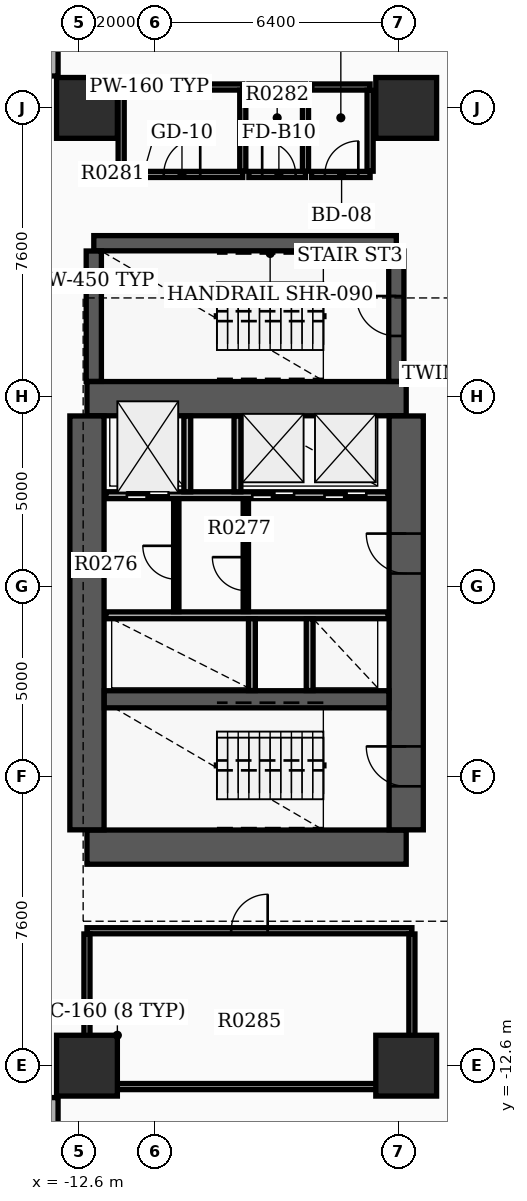
"""IFC4 building model, lengths in metres.
Left out: names, types, materials, properties, quantities, classifications, styles, units other than length and angle.
Written with IfcOpenShell. Run it as: python <this file> out.ifc"""

import sys

from ifc_helpers import new_model, si_unit, direction, frame, frame_2d, origin, origin_2d, place, context, subcontext, project, spatial, rectangle, extrude, element, fill, save


model = new_model("IFC4")
c1 = context("Model", 3, precision=1e-05, world=origin(), true_north=direction((0.0, 1.0)))
c2 = subcontext(c1, "Body", "Model", "MODEL_VIEW")
j1 = project(units=[si_unit("LENGTHUNIT", "METRE"), si_unit("PLANEANGLEUNIT", "RADIAN")], contexts=[c1])
p1 = place(None, origin())
s1 = spatial("IfcSite", under=j1, at=p1, CompositionType="ELEMENT")
p2 = place(p1, origin())
s2 = spatial("IfcBuilding", under=s1, at=p2, CompositionType="ELEMENT")
p3 = place(p2, frame((0.0, 0.0, 23.7)))
s3 = spatial("IfcBuildingStorey", under=s2, at=p3, CompositionType="ELEMENT", Elevation=23.7)
for number, where, z_axis, x_axis in (
    (1, (-12.4, -6.85, 0.0), (0.0, 0.0, 1.0), (1.0, 0.0, 0.0)),
    (2, (-12.4, 4.95, 0.0), (0.0, 0.0, 1.0), (1.0, 0.0, 0.0)),
):
    element("IfcWall", number, at=place(p3, frame(where, z_axis=z_axis, x_axis=x_axis)), inside=s3, PredefinedType="SHEAR", context=c2, shape_type="SweptSolid", body=[
        extrude(rectangle(XDim=8.4, YDim=0.9, at=frame_2d((4.2, 0.0))), origin(), (0.0, 0.0, 1.0), 3.7),
    ])
p4 = place(p3, frame((-12.4, -6.395, 0.0), z_axis=(0.0, 0.0, 1.0), x_axis=(0.0, 1.0, 0.0)))
e3 = element("IfcWall", 3, at=p4, inside=s3, PredefinedType="SHEAR", context=c2, shape_type="SweptSolid", body=[
    extrude(rectangle(XDim=10.89, YDim=0.9, at=frame_2d((5.445, 0.0))), origin(), (0.0, 0.0, 1.0), 3.7),
])
p5 = place(p3, frame((-4.0, -6.395, 0.0), z_axis=(0.0, 0.0, 1.0), x_axis=(0.0, 1.0, 0.0)))
e4 = element("IfcWall", 4, at=p5, inside=s3, PredefinedType="SHEAR", context=c2, shape_type="SweptSolid", body=[
    extrude(rectangle(XDim=10.89, YDim=0.9, at=frame_2d((5.445, 0.0))), origin(), (0.0, 0.0, 1.0), 3.7),
])
p6 = place(p5, frame((1.145, 0.0, 0.0)))
e5 = element("IfcOpeningElement", 5, at=p6, cuts=e4, PredefinedType="OPENING", context=c2, shape_type="SweptSolid", body=[
    extrude(rectangle(XDim=1.05, YDim=2.15, at=frame_2d((0.525, 1.075))), frame((0.0, 0.46, 0.0), z_axis=(0.0, -1.0, 0.0), x_axis=(1.0, 0.0, 0.0)), (0.0, 0.0, 1.0), 0.92),
])
p7 = place(p5, frame((6.745, 0.0, 0.0)))
e6 = element("IfcOpeningElement", 6, at=p7, cuts=e4, PredefinedType="OPENING", context=c2, shape_type="SweptSolid", body=[
    extrude(rectangle(XDim=1.05, YDim=2.15, at=frame_2d((0.525, 1.075))), frame((0.0, 0.46, 0.0), z_axis=(0.0, -1.0, 0.0), x_axis=(1.0, 0.0, 0.0)), (0.0, 0.0, 1.0), 0.92),
])
p8 = place(p3, frame((-11.945, -2.96, 0.0), z_axis=(0.0, 0.0, 1.0), x_axis=(1.0, 0.0, 0.0)))
e7 = element("IfcWall", 7, at=p8, inside=s3, PredefinedType="SHEAR", context=c2, shape_type="SweptSolid", body=[
    extrude(rectangle(XDim=7.49, YDim=0.45, at=frame_2d((3.745, 0.0))), origin(), (0.0, 0.0, 1.0), 3.7),
])
p9 = place(p3, frame((-12.22, 9.04, 0.0), z_axis=(0.0, 0.0, 1.0), x_axis=(1.0, 0.0, 0.0)))
e8 = element("IfcWall", 8, at=p9, inside=s3, PredefinedType="SHEAR", context=c2, shape_type="SweptSolid", body=[
    extrude(rectangle(XDim=7.96, YDim=0.4, at=frame_2d((3.98, 0.0))), origin(), (0.0, 0.0, 1.0), 3.7),
])
p10 = place(p3, frame((-12.22, 5.405, 0.0), z_axis=(0.0, 0.0, 1.0), x_axis=(0.0, 1.0, 0.0)))
e9 = element("IfcWall", 9, at=p10, inside=s3, PredefinedType="SHEAR", context=c2, shape_type="SweptSolid", body=[
    extrude(rectangle(XDim=3.43, YDim=0.4, at=frame_2d((1.715, 0.0))), origin(), (0.0, 0.0, 1.0), 3.7),
])
p11 = place(p3, frame((-4.26, 5.405, 0.0), z_axis=(0.0, 0.0, 1.0), x_axis=(0.0, 1.0, 0.0)))
e10 = element("IfcWall", 10, at=p11, inside=s3, PredefinedType="SHEAR", context=c2, shape_type="SweptSolid", body=[
    extrude(rectangle(XDim=3.43, YDim=0.4, at=frame_2d((1.715, 0.0))), origin(), (0.0, 0.0, 1.0), 3.7),
])
p12 = place(p11, frame((1.195, 0.0, 0.0)))
e11 = element("IfcOpeningElement", 11, at=p12, cuts=e10, PredefinedType="OPENING", context=c2, shape_type="SweptSolid", body=[
    extrude(rectangle(XDim=1.05, YDim=2.15, at=frame_2d((0.525, 1.075))), frame((0.0, 0.21, 0.0), z_axis=(0.0, -1.0, 0.0), x_axis=(1.0, 0.0, 0.0)), (0.0, 0.0, 1.0), 0.42),
])
for number, where, z_axis, x_axis in (
    (12, (-12.4, -12.6, 0.0), (0.0, 0.0, 1.0), (1.0, 0.0, 0.0)),
    (13, (-12.4, 12.6, 0.0), (0.0, 0.0, 1.0), (1.0, 0.0, 0.0)),
    (14, (-4.0, -12.6, 0.0), (0.0, 0.0, 1.0), (1.0, 0.0, 0.0)),
    (15, (-4.0, 12.6, 0.0), (0.0, 0.0, 1.0), (1.0, 0.0, 0.0)),
):
    element("IfcColumn", number, at=place(p3, frame(where, z_axis=z_axis, x_axis=x_axis)), inside=s3, PredefinedType="COLUMN", context=c2, shape_type="SweptSolid", body=[
        extrude(rectangle(XDim=1.6, YDim=1.6, at=origin_2d()), origin(), (0.0, 0.0, 1.0), 3.9),
    ])
for number, where, z_axis, x_axis in (
    (16, (-13.3, 13.44, 0.0), (0.0, 0.0, 1.0), (0.0, 1.0, 0.0)),
    (17, (-13.3, -13.44, 0.0), (0.0, 0.0, 1.0), (0.0, -1.0, 0.0)),
):
    element("IfcWall", number, at=place(p3, frame(where, z_axis=z_axis, x_axis=x_axis)), inside=s3, PredefinedType="STANDARD", context=c2, shape_type="SweptSolid", body=[
        extrude(rectangle(XDim=1.5, YDim=0.28, at=frame_2d((0.75, 0.0))), origin(), (0.0, 0.0, 1.0), 2.91),
    ])
p13 = place(p3, frame((-11.9, 2.41, 0.0), z_axis=(0.0, 0.0, 1.0), x_axis=(1.0, 0.0, 0.0)))
e18 = element("IfcWall", 18, at=p13, inside=s3, PredefinedType="SOLIDWALL", context=c2, shape_type="SweptSolid", body=[
    extrude(rectangle(XDim=7.42, YDim=0.18, at=frame_2d((3.71, 0.0))), origin(), (0.0, 0.0, 1.0), 2.9),
])
p14 = place(p13, frame((0.55, 0.0, 0.0)))
e19 = element("IfcOpeningElement", 19, at=p14, cuts=e18, PredefinedType="OPENING", context=c2, shape_type="SweptSolid", body=[
    extrude(rectangle(XDim=1.1, YDim=2.15, at=frame_2d((0.55, 1.075))), frame((0.0, 0.1, 0.0), z_axis=(0.0, -1.0, 0.0), x_axis=(1.0, 0.0, 0.0)), (0.0, 0.0, 1.0), 0.2),
])
p15 = place(p13, frame((3.85, 0.0, 0.0)))
e20 = element("IfcOpeningElement", 20, at=p15, cuts=e18, PredefinedType="OPENING", context=c2, shape_type="SweptSolid", body=[
    extrude(rectangle(XDim=1.1, YDim=2.15, at=frame_2d((0.55, 1.075))), frame((0.0, 0.1, 0.0), z_axis=(0.0, -1.0, 0.0), x_axis=(1.0, 0.0, 0.0)), (0.0, 0.0, 1.0), 0.2),
])
p16 = place(p13, frame((5.75, 0.0, 0.0)))
e21 = element("IfcOpeningElement", 21, at=p16, cuts=e18, PredefinedType="OPENING", context=c2, shape_type="SweptSolid", body=[
    extrude(rectangle(XDim=1.1, YDim=2.15, at=frame_2d((0.55, 1.075))), frame((0.0, 0.1, 0.0), z_axis=(0.0, -1.0, 0.0), x_axis=(1.0, 0.0, 0.0)), (0.0, 0.0, 1.0), 0.2),
])
p17 = place(p3, frame((-11.9, -0.75, 0.0), z_axis=(0.0, 0.0, 1.0), x_axis=(1.0, 0.0, 0.0)))
e22 = element("IfcWall", 22, at=p17, inside=s3, PredefinedType="SOLIDWALL", context=c2, shape_type="SweptSolid", body=[
    extrude(rectangle(XDim=7.42, YDim=0.18, at=frame_2d((3.71, 0.0))), origin(), (0.0, 0.0, 1.0), 2.9),
])
for number, where, z_axis, x_axis in (
    (23, (-9.76, 2.5, 0.0), (0.0, 0.0, 1.0), (0.0, 1.0, 0.0)),
    (24, (-8.44, 2.5, 0.0), (0.0, 0.0, 1.0), (0.0, 1.0, 0.0)),
):
    element("IfcWall", number, at=place(p3, frame(where, z_axis=z_axis, x_axis=x_axis)), inside=s3, PredefinedType="SOLIDWALL", context=c2, shape_type="SweptSolid", body=[
        extrude(rectangle(XDim=1.99, YDim=0.18, at=frame_2d((0.995, 0.0))), origin(), (0.0, 0.0, 1.0), 2.9),
    ])
for number, where, z_axis, x_axis in (
    (25, (-8.06, -2.73, 0.0), (0.0, 0.0, 1.0), (0.0, 1.0, 0.0)),
    (26, (-6.54, -2.73, 0.0), (0.0, 0.0, 1.0), (0.0, 1.0, 0.0)),
):
    element("IfcWall", number, at=place(p3, frame(where, z_axis=z_axis, x_axis=x_axis)), inside=s3, PredefinedType="SOLIDWALL", context=c2, shape_type="SweptSolid", body=[
        extrude(rectangle(XDim=1.89, YDim=0.18, at=frame_2d((0.945, 0.0))), origin(), (0.0, 0.0, 1.0), 2.9),
    ])
p18 = place(p3, frame((-8.22, -0.65, 0.0), z_axis=(0.0, 0.0, 1.0), x_axis=(0.0, 1.0, 0.0)))
e27 = element("IfcWall", 27, at=p18, inside=s3, PredefinedType="SOLIDWALL", context=c2, shape_type="SweptSolid", body=[
    extrude(rectangle(XDim=2.96, YDim=0.14, at=frame_2d((1.48, 0.0))), origin(), (0.0, 0.0, 1.0), 2.9),
])
p19 = place(p18, frame((0.55, 0.0, 0.0)))
e28 = element("IfcOpeningElement", 28, at=p19, cuts=e27, PredefinedType="OPENING", context=c2, shape_type="SweptSolid", body=[
    extrude(rectangle(XDim=0.88, YDim=2.1, at=frame_2d((0.44, 1.05))), frame((0.0, 0.08, 0.0), z_axis=(0.0, -1.0, 0.0), x_axis=(1.0, 0.0, 0.0)), (0.0, 0.0, 1.0), 0.16),
])
p20 = place(p3, frame((-10.05, -0.652, 0.0), z_axis=(0.0, 0.0, 1.0), x_axis=(0.0, 1.0, 0.0)))
e29 = element("IfcWall", 29, at=p20, inside=s3, PredefinedType="PARTITIONING", context=c2, shape_type="SweptSolid", body=[
    extrude(rectangle(XDim=2.962, YDim=0.14, at=frame_2d((1.481, 0.0))), origin(), (0.0, 0.0, 1.0), 2.9),
])
p21 = place(p20, frame((0.85, 0.0, 0.0)))
e30 = element("IfcOpeningElement", 30, at=p21, cuts=e29, PredefinedType="OPENING", context=c2, shape_type="SweptSolid", body=[
    extrude(rectangle(XDim=0.88, YDim=2.1, at=frame_2d((0.44, 1.05))), frame((0.0, 0.08, 0.0), z_axis=(0.0, -1.0, 0.0), x_axis=(1.0, 0.0, 0.0)), (0.0, 0.0, 1.0), 0.16),
])
p22 = place(p3, frame((-11.5, 10.85, 0.0), z_axis=(0.0, 0.0, 1.0), x_axis=(1.0, 0.0, 0.0)))
e31 = element("IfcWall", 31, at=p22, inside=s3, PredefinedType="PARTITIONING", context=c2, shape_type="SweptSolid", body=[
    extrude(rectangle(XDim=3.2, YDim=0.16, at=frame_2d((1.6, 0.0))), origin(), (0.0, 0.0, 1.0), 2.9),
])
p23 = place(p22, frame((1.12, 0.0, 0.0)))
e32 = element("IfcOpeningElement", 32, at=p23, cuts=e31, PredefinedType="OPENING", context=c2, shape_type="SweptSolid", body=[
    extrude(rectangle(XDim=0.96, YDim=2.15, at=frame_2d((0.48, 1.075))), frame((0.0, 0.09, 0.0), z_axis=(0.0, -1.0, 0.0), x_axis=(1.0, 0.0, 0.0)), (0.0, 0.0, 1.0), 0.18),
])
p24 = place(p3, frame((-11.5, 13.15, 0.0), z_axis=(0.0, 0.0, 1.0), x_axis=(1.0, 0.0, 0.0)))
e33 = element("IfcWall", 33, at=p24, inside=s3, PredefinedType="PARTITIONING", context=c2, shape_type="SweptSolid", body=[
    extrude(rectangle(XDim=3.2, YDim=0.16, at=frame_2d((1.6, 0.0))), origin(), (0.0, 0.0, 1.0), 2.9),
])
for number, where, z_axis, x_axis in (
    (34, (-11.5, 10.935, 0.0), (0.0, 0.0, 1.0), (0.0, 1.0, 0.0)),
    (35, (-8.3, 10.935, 0.0), (0.0, 0.0, 1.0), (0.0, 1.0, 0.0)),
):
    element("IfcWall", number, at=place(p3, frame(where, z_axis=z_axis, x_axis=x_axis)), inside=s3, PredefinedType="PARTITIONING", context=c2, shape_type="SweptSolid", body=[
        extrude(rectangle(XDim=2.13, YDim=0.16, at=frame_2d((1.065, 0.0))), origin(), (0.0, 0.0, 1.0), 2.9),
    ])
p25 = place(p3, frame((-8.14, 10.85, 0.0), z_axis=(0.0, 0.0, 1.0), x_axis=(1.0, 0.0, 0.0)))
e36 = element("IfcWall", 36, at=p25, inside=s3, PredefinedType="PARTITIONING", context=c2, shape_type="SweptSolid", body=[
    extrude(rectangle(XDim=1.49, YDim=0.16, at=frame_2d((0.745, 0.0))), origin(), (0.0, 0.0, 1.0), 2.9),
])
p26 = place(p25, frame((0.35, 0.0, 0.0)))
e37 = element("IfcOpeningElement", 37, at=p26, cuts=e36, PredefinedType="OPENING", context=c2, shape_type="SweptSolid", body=[
    extrude(rectangle(XDim=0.88, YDim=2.1, at=frame_2d((0.44, 1.05))), frame((0.0, 0.09, 0.0), z_axis=(0.0, -1.0, 0.0), x_axis=(1.0, 0.0, 0.0)), (0.0, 0.0, 1.0), 0.18),
])
p27 = place(p3, frame((-8.14, 13.15, 0.0), z_axis=(0.0, 0.0, 1.0), x_axis=(1.0, 0.0, 0.0)))
e38 = element("IfcWall", 38, at=p27, inside=s3, PredefinedType="PARTITIONING", context=c2, shape_type="SweptSolid", body=[
    extrude(rectangle(XDim=1.49, YDim=0.16, at=frame_2d((0.745, 0.0))), origin(), (0.0, 0.0, 1.0), 2.9),
])
p28 = place(p3, frame((-6.65, 10.935, 0.0), z_axis=(0.0, 0.0, 1.0), x_axis=(0.0, 1.0, 0.0)))
e39 = element("IfcWall", 39, at=p28, inside=s3, PredefinedType="PARTITIONING", context=c2, shape_type="SweptSolid", body=[
    extrude(rectangle(XDim=2.13, YDim=0.16, at=frame_2d((1.065, 0.0))), origin(), (0.0, 0.0, 1.0), 2.9),
])
p29 = place(p3, frame((-6.49, 10.85, 0.0), z_axis=(0.0, 0.0, 1.0), x_axis=(1.0, 0.0, 0.0)))
e40 = element("IfcWall", 40, at=p29, inside=s3, PredefinedType="PARTITIONING", context=c2, shape_type="SweptSolid", body=[
    extrude(rectangle(XDim=1.54, YDim=0.16, at=frame_2d((0.77, 0.0))), origin(), (0.0, 0.0, 1.0), 2.9),
])
p30 = place(p29, frame((0.35, 0.0, 0.0)))
e41 = element("IfcOpeningElement", 41, at=p30, cuts=e40, PredefinedType="OPENING", context=c2, shape_type="SweptSolid", body=[
    extrude(rectangle(XDim=0.88, YDim=2.15, at=frame_2d((0.44, 1.075))), frame((0.0, 0.09, 0.0), z_axis=(0.0, -1.0, 0.0), x_axis=(1.0, 0.0, 0.0)), (0.0, 0.0, 1.0), 0.18),
])
p31 = place(p3, frame((-6.49, 13.15, 0.0), z_axis=(0.0, 0.0, 1.0), x_axis=(1.0, 0.0, 0.0)))
e42 = element("IfcWall", 42, at=p31, inside=s3, PredefinedType="PARTITIONING", context=c2, shape_type="SweptSolid", body=[
    extrude(rectangle(XDim=1.54, YDim=0.16, at=frame_2d((0.77, 0.0))), origin(), (0.0, 0.0, 1.0), 2.9),
])
p32 = place(p3, frame((-4.95, 10.935, 0.0), z_axis=(0.0, 0.0, 1.0), x_axis=(0.0, 1.0, 0.0)))
e43 = element("IfcWall", 43, at=p32, inside=s3, PredefinedType="PARTITIONING", context=c2, shape_type="SweptSolid", body=[
    extrude(rectangle(XDim=2.13, YDim=0.16, at=frame_2d((1.065, 0.0))), origin(), (0.0, 0.0, 1.0), 2.9),
])
p33 = place(p3, frame((-12.4, -13.15, 0.0), z_axis=(0.0, 0.0, 1.0), x_axis=(1.0, 0.0, 0.0)))
e44 = element("IfcWall", 44, at=p33, inside=s3, PredefinedType="PARTITIONING", context=c2, shape_type="SweptSolid", body=[
    extrude(rectangle(XDim=8.55, YDim=0.16, at=frame_2d((4.275, 0.0))), origin(), (0.0, 0.0, 1.0), 2.9),
])
p34 = place(p3, frame((-12.4, -9.05, 0.0), z_axis=(0.0, 0.0, 1.0), x_axis=(1.0, 0.0, 0.0)))
e45 = element("IfcWall", 45, at=p34, inside=s3, PredefinedType="PARTITIONING", context=c2, shape_type="SweptSolid", body=[
    extrude(rectangle(XDim=8.55, YDim=0.16, at=frame_2d((4.275, 0.0))), origin(), (0.0, 0.0, 1.0), 2.9),
])
p35 = place(p34, frame((3.795, 0.0, 0.0)))
e46 = element("IfcOpeningElement", 46, at=p35, cuts=e45, PredefinedType="OPENING", context=c2, shape_type="SweptSolid", body=[
    extrude(rectangle(XDim=0.96, YDim=2.15, at=frame_2d((0.48, 1.075))), frame((0.0, 0.09, 0.0), z_axis=(0.0, -1.0, 0.0), x_axis=(1.0, 0.0, 0.0)), (0.0, 0.0, 1.0), 0.18),
])
for number, where, z_axis, x_axis in (
    (47, (-12.4, -13.065, 0.0), (0.0, 0.0, 1.0), (0.0, 1.0, 0.0)),
    (48, (-3.85, -13.065, 0.0), (0.0, 0.0, 1.0), (0.0, 1.0, 0.0)),
):
    element("IfcWall", number, at=place(p3, frame(where, z_axis=z_axis, x_axis=x_axis)), inside=s3, PredefinedType="PARTITIONING", context=c2, shape_type="SweptSolid", body=[
        extrude(rectangle(XDim=3.93, YDim=0.16, at=frame_2d((1.965, 0.0))), origin(), (0.0, 0.0, 1.0), 2.9),
    ])
p36 = place(p6, origin())
e49 = element("IfcDoor", 49, at=p36, inside=s3, OperationType="SINGLE_SWING_RIGHT", PredefinedType="DOOR", context=c2, shape_type="SweptSolid", body=[
    extrude(rectangle(XDim=1.05, YDim=2.15, at=frame_2d((0.525, 1.075))), frame((0.0, 0.025, 0.0), z_axis=(0.0, -1.0, 0.0), x_axis=(1.0, 0.0, 0.0)), (0.0, 0.0, 1.0), 0.05),
])
fill(e5, e49)
p37 = place(p7, origin())
e50 = element("IfcDoor", 50, at=p37, inside=s3, OperationType="SINGLE_SWING_RIGHT", PredefinedType="DOOR", context=c2, shape_type="SweptSolid", body=[
    extrude(rectangle(XDim=1.05, YDim=2.15, at=frame_2d((0.525, 1.075))), frame((0.0, 0.025, 0.0), z_axis=(0.0, -1.0, 0.0), x_axis=(1.0, 0.0, 0.0)), (0.0, 0.0, 1.0), 0.05),
])
fill(e6, e50)
p38 = place(p12, origin())
e51 = element("IfcDoor", 51, at=p38, inside=s3, OperationType="SINGLE_SWING_RIGHT", PredefinedType="DOOR", context=c2, shape_type="SweptSolid", body=[
    extrude(rectangle(XDim=1.05, YDim=2.15, at=frame_2d((0.525, 1.075))), frame((0.0, 0.025, 0.0), z_axis=(0.0, -1.0, 0.0), x_axis=(1.0, 0.0, 0.0)), (0.0, 0.0, 1.0), 0.05),
])
fill(e11, e51)
p39 = place(p14, origin())
e52 = element("IfcDoor", 52, at=p39, inside=s3, OperationType="DOUBLE_DOOR_SLIDING", PredefinedType="DOOR", context=c2, shape_type="SweptSolid", body=[
    extrude(rectangle(XDim=1.1, YDim=2.15, at=frame_2d((0.55, 1.075))), frame((0.0, 0.025, 0.0), z_axis=(0.0, -1.0, 0.0), x_axis=(1.0, 0.0, 0.0)), (0.0, 0.0, 1.0), 0.05),
])
fill(e19, e52)
p40 = place(p15, origin())
e53 = element("IfcDoor", 53, at=p40, inside=s3, OperationType="DOUBLE_DOOR_SLIDING", PredefinedType="DOOR", context=c2, shape_type="SweptSolid", body=[
    extrude(rectangle(XDim=1.1, YDim=2.15, at=frame_2d((0.55, 1.075))), frame((0.0, 0.025, 0.0), z_axis=(0.0, -1.0, 0.0), x_axis=(1.0, 0.0, 0.0)), (0.0, 0.0, 1.0), 0.05),
])
fill(e20, e53)
p41 = place(p16, origin())
e54 = element("IfcDoor", 54, at=p41, inside=s3, OperationType="DOUBLE_DOOR_SLIDING", PredefinedType="DOOR", context=c2, shape_type="SweptSolid", body=[
    extrude(rectangle(XDim=1.1, YDim=2.15, at=frame_2d((0.55, 1.075))), frame((0.0, 0.025, 0.0), z_axis=(0.0, -1.0, 0.0), x_axis=(1.0, 0.0, 0.0)), (0.0, 0.0, 1.0), 0.05),
])
fill(e21, e54)
p42 = place(p19, origin())
e55 = element("IfcDoor", 55, at=p42, inside=s3, OperationType="SINGLE_SWING_RIGHT", PredefinedType="DOOR", context=c2, shape_type="SweptSolid", body=[
    extrude(rectangle(XDim=0.88, YDim=2.1, at=frame_2d((0.44, 1.05))), frame((0.0, 0.025, 0.0), z_axis=(0.0, -1.0, 0.0), x_axis=(1.0, 0.0, 0.0)), (0.0, 0.0, 1.0), 0.05),
])
fill(e28, e55)
p43 = place(p21, origin())
e56 = element("IfcDoor", 56, at=p43, inside=s3, OperationType="SINGLE_SWING_RIGHT", PredefinedType="DOOR", context=c2, shape_type="SweptSolid", body=[
    extrude(rectangle(XDim=0.88, YDim=2.1, at=frame_2d((0.44, 1.05))), frame((0.0, 0.025, 0.0), z_axis=(0.0, -1.0, 0.0), x_axis=(1.0, 0.0, 0.0)), (0.0, 0.0, 1.0), 0.05),
])
fill(e30, e56)
p44 = place(p23, origin())
e57 = element("IfcDoor", 57, at=p44, inside=s3, OperationType="SINGLE_SWING_RIGHT", PredefinedType="DOOR", context=c2, shape_type="SweptSolid", body=[
    extrude(rectangle(XDim=0.96, YDim=2.15, at=frame_2d((0.48, 1.075))), frame((0.0, 0.025, 0.0), z_axis=(0.0, -1.0, 0.0), x_axis=(1.0, 0.0, 0.0)), (0.0, 0.0, 1.0), 0.05),
])
fill(e32, e57)
p45 = place(p26, origin())
e58 = element("IfcDoor", 58, at=p45, inside=s3, OperationType="SINGLE_SWING_LEFT", PredefinedType="DOOR", context=c2, shape_type="SweptSolid", body=[
    extrude(rectangle(XDim=0.88, YDim=2.1, at=frame_2d((0.44, 1.05))), frame((0.0, 0.025, 0.0), z_axis=(0.0, -1.0, 0.0), x_axis=(1.0, 0.0, 0.0)), (0.0, 0.0, 1.0), 0.05),
])
fill(e37, e58)
p46 = place(p30, origin())
e59 = element("IfcDoor", 59, at=p46, inside=s3, OperationType="SINGLE_SWING_RIGHT", PredefinedType="DOOR", context=c2, shape_type="SweptSolid", body=[
    extrude(rectangle(XDim=0.88, YDim=2.15, at=frame_2d((0.44, 1.075))), frame((0.0, 0.025, 0.0), z_axis=(0.0, -1.0, 0.0), x_axis=(1.0, 0.0, 0.0)), (0.0, 0.0, 1.0), 0.05),
])
fill(e41, e59)
p47 = place(p35, origin())
e60 = element("IfcDoor", 60, at=p47, inside=s3, OperationType="SINGLE_SWING_RIGHT", PredefinedType="DOOR", context=c2, shape_type="SweptSolid", body=[
    extrude(rectangle(XDim=0.96, YDim=2.15, at=frame_2d((0.48, 1.075))), frame((0.0, 0.025, 0.0), z_axis=(0.0, -1.0, 0.0), x_axis=(1.0, 0.0, 0.0)), (0.0, 0.0, 1.0), 0.05),
])
fill(e46, e60)
save(model, sys.argv[1])
